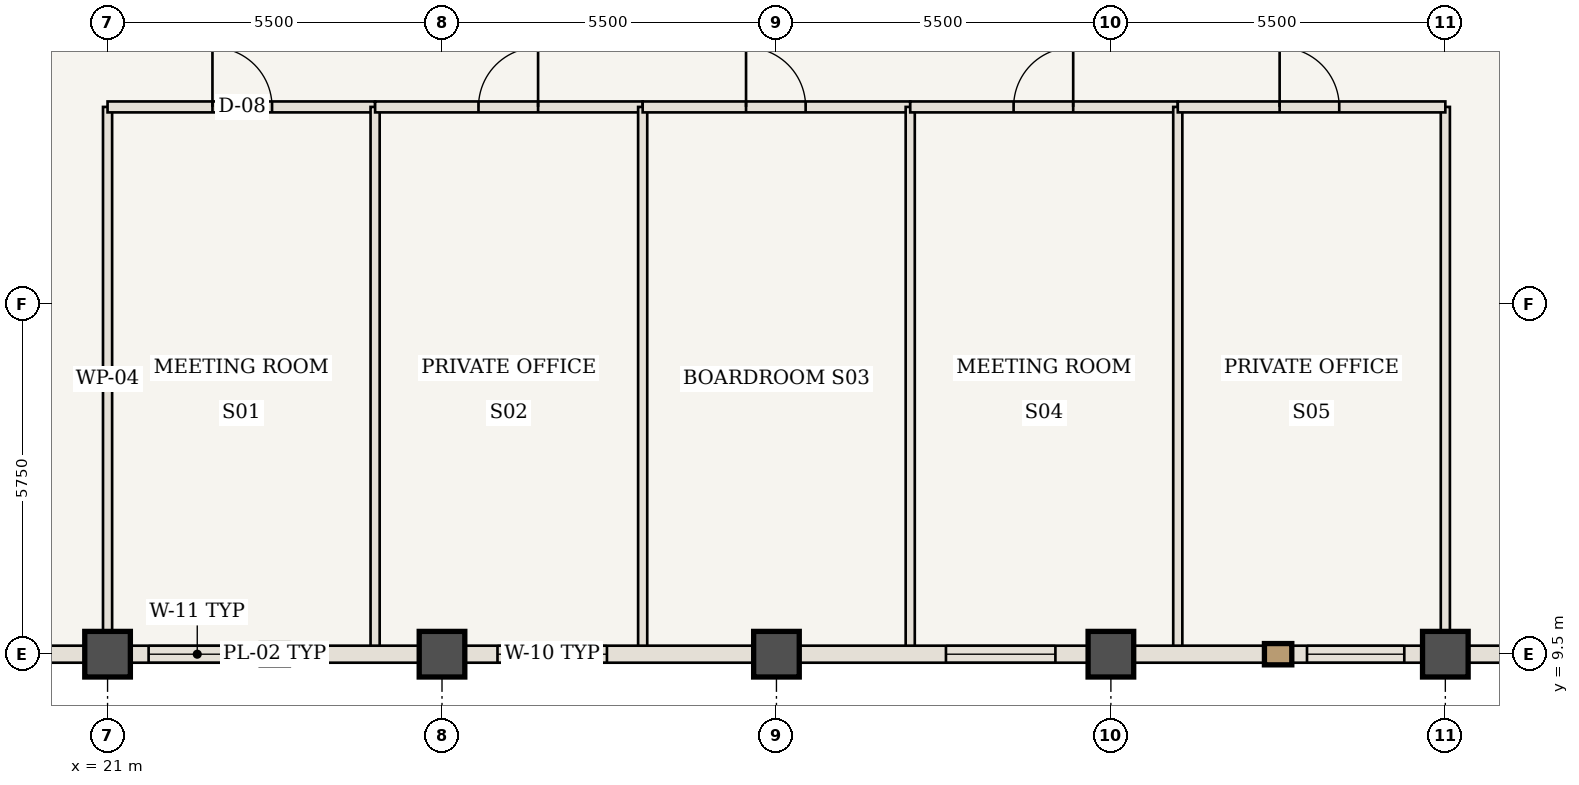
"""IFC4 building model, lengths in metres.
Left out: names, types, materials, properties, quantities, classifications, styles, units other than length and angle.
Written with IfcOpenShell. Run it as: python <this file> out.ifc"""

import sys

from ifc_helpers import new_model, si_unit, direction, frame, frame_2d, origin, origin_2d, place, context, subcontext, project, spatial, rectangle, extrude, element, fill, save


model = new_model("IFC4")
c1 = context("Model", 3, precision=1e-05, world=origin(), true_north=direction((0.0, 1.0)))
c2 = subcontext(c1, "Body", "Model", "MODEL_VIEW")
j1 = project(units=[si_unit("LENGTHUNIT", "METRE"), si_unit("PLANEANGLEUNIT", "RADIAN")], contexts=[c1])
p1 = place(None, origin())
s1 = spatial("IfcSite", under=j1, at=p1, CompositionType="ELEMENT")
p2 = place(p1, origin())
s2 = spatial("IfcBuilding", under=s1, at=p2, CompositionType="ELEMENT")
p3 = place(p2, frame((0.0, 0.0, 285.25)))
s3 = spatial("IfcBuildingStorey", under=s2, at=p3, CompositionType="ELEMENT", Elevation=285.25)
for number, where, z_axis, x_axis in (
    (1, (21.0, 9.5, 0.0), (0.0, 0.0, 1.0), (1.0, 0.0, 0.0)),
    (2, (26.5, 9.5, 0.0), (0.0, 0.0, 1.0), (1.0, 0.0, 0.0)),
    (3, (32.0, 9.5, 0.0), (0.0, 0.0, 1.0), (1.0, 0.0, 0.0)),
    (4, (37.5, 9.5, 0.0), (0.0, 0.0, 1.0), (1.0, 0.0, 0.0)),
    (5, (43.0, 9.5, 0.0), (0.0, 0.0, 1.0), (1.0, 0.0, 0.0)),
):
    element("IfcColumn", number, at=place(p3, frame(where, z_axis=z_axis, x_axis=x_axis)), inside=s3, PredefinedType="COLUMN", context=c2, shape_type="SweptSolid", body=[
        extrude(rectangle(XDim=0.75, YDim=0.75, at=origin_2d()), origin(), (0.0, 0.0, 1.0), 3.85),
    ])
for number, where, z_axis, x_axis in (
    (6, (21.0, 9.56, 0.0), (0.0, 0.0, 1.0), (0.0, 1.0, 0.0)),
    (7, (43.0, 9.56, 0.0), (0.0, 0.0, 1.0), (0.0, 1.0, 0.0)),
):
    element("IfcWall", number, at=place(p3, frame(where, z_axis=z_axis, x_axis=x_axis)), inside=s3, PredefinedType="STANDARD", context=c2, shape_type="SweptSolid", body=[
        extrude(rectangle(XDim=8.94, YDim=0.15, at=frame_2d((4.47, 0.0))), origin(), (0.0, 0.0, 1.0), 3.685),
    ])
p4 = place(p3, frame((21.0, 18.5, 0.0), z_axis=(0.0, 0.0, 1.0), x_axis=(1.0, 0.0, 0.0)))
e8 = element("IfcWall", 8, at=p4, inside=s3, PredefinedType="STANDARD", context=c2, shape_type="SweptSolid", body=[
    extrude(rectangle(XDim=4.4, YDim=0.18, at=frame_2d((2.2, 0.0))), origin(), (0.0, 0.0, 1.0), 3.685),
])
p5 = place(p4, frame((1.725, 0.0, 0.0)))
e9 = element("IfcOpeningElement", 9, at=p5, cuts=e8, PredefinedType="OPENING", context=c2, shape_type="SweptSolid", body=[
    extrude(rectangle(XDim=0.98, YDim=2.2, at=frame_2d((0.49, 1.1))), frame((0.0, 0.1, 0.0), z_axis=(0.0, -1.0, 0.0), x_axis=(1.0, 0.0, 0.0)), (0.0, 0.0, 1.0), 0.2),
])
p6 = place(p3, frame((25.4, 9.56, 0.0), z_axis=(0.0, 0.0, 1.0), x_axis=(0.0, 1.0, 0.0)))
e10 = element("IfcWall", 10, at=p6, inside=s3, PredefinedType="STANDARD", context=c2, shape_type="SweptSolid", body=[
    extrude(rectangle(XDim=8.94, YDim=0.15, at=frame_2d((4.47, 0.0))), origin(), (0.0, 0.0, 1.0), 3.685),
])
p7 = place(p3, frame((25.4, 18.5, 0.0), z_axis=(0.0, 0.0, 1.0), x_axis=(1.0, 0.0, 0.0)))
e11 = element("IfcWall", 11, at=p7, inside=s3, PredefinedType="STANDARD", context=c2, shape_type="SweptSolid", body=[
    extrude(rectangle(XDim=4.4, YDim=0.18, at=frame_2d((2.2, 0.0))), origin(), (0.0, 0.0, 1.0), 3.685),
])
p8 = place(p7, frame((1.7, 0.0, 0.0)))
e12 = element("IfcOpeningElement", 12, at=p8, cuts=e11, PredefinedType="OPENING", context=c2, shape_type="SweptSolid", body=[
    extrude(rectangle(XDim=0.98, YDim=2.2, at=frame_2d((0.49, 1.1))), frame((0.0, 0.1, 0.0), z_axis=(0.0, -1.0, 0.0), x_axis=(1.0, 0.0, 0.0)), (0.0, 0.0, 1.0), 0.2),
])
p9 = place(p3, frame((29.8, 9.56, 0.0), z_axis=(0.0, 0.0, 1.0), x_axis=(0.0, 1.0, 0.0)))
e13 = element("IfcWall", 13, at=p9, inside=s3, PredefinedType="STANDARD", context=c2, shape_type="SweptSolid", body=[
    extrude(rectangle(XDim=8.94, YDim=0.15, at=frame_2d((4.47, 0.0))), origin(), (0.0, 0.0, 1.0), 3.685),
])
p10 = place(p3, frame((29.8, 18.5, 0.0), z_axis=(0.0, 0.0, 1.0), x_axis=(1.0, 0.0, 0.0)))
e14 = element("IfcWall", 14, at=p10, inside=s3, PredefinedType="STANDARD", context=c2, shape_type="SweptSolid", body=[
    extrude(rectangle(XDim=4.4, YDim=0.18, at=frame_2d((2.2, 0.0))), origin(), (0.0, 0.0, 1.0), 3.685),
])
p11 = place(p10, frame((1.7, 0.0, 0.0)))
e15 = element("IfcOpeningElement", 15, at=p11, cuts=e14, PredefinedType="OPENING", context=c2, shape_type="SweptSolid", body=[
    extrude(rectangle(XDim=0.98, YDim=2.2, at=frame_2d((0.49, 1.1))), frame((0.0, 0.1, 0.0), z_axis=(0.0, -1.0, 0.0), x_axis=(1.0, 0.0, 0.0)), (0.0, 0.0, 1.0), 0.2),
])
p12 = place(p3, frame((34.2, 9.56, 0.0), z_axis=(0.0, 0.0, 1.0), x_axis=(0.0, 1.0, 0.0)))
e16 = element("IfcWall", 16, at=p12, inside=s3, PredefinedType="STANDARD", context=c2, shape_type="SweptSolid", body=[
    extrude(rectangle(XDim=8.94, YDim=0.15, at=frame_2d((4.47, 0.0))), origin(), (0.0, 0.0, 1.0), 3.685),
])
p13 = place(p3, frame((34.2, 18.5, 0.0), z_axis=(0.0, 0.0, 1.0), x_axis=(1.0, 0.0, 0.0)))
e17 = element("IfcWall", 17, at=p13, inside=s3, PredefinedType="STANDARD", context=c2, shape_type="SweptSolid", body=[
    extrude(rectangle(XDim=4.4, YDim=0.18, at=frame_2d((2.2, 0.0))), origin(), (0.0, 0.0, 1.0), 3.685),
])
p14 = place(p13, frame((1.7, 0.0, 0.0)))
e18 = element("IfcOpeningElement", 18, at=p14, cuts=e17, PredefinedType="OPENING", context=c2, shape_type="SweptSolid", body=[
    extrude(rectangle(XDim=0.98, YDim=2.2, at=frame_2d((0.49, 1.1))), frame((0.0, 0.1, 0.0), z_axis=(0.0, -1.0, 0.0), x_axis=(1.0, 0.0, 0.0)), (0.0, 0.0, 1.0), 0.2),
])
p15 = place(p3, frame((38.6, 9.56, 0.0), z_axis=(0.0, 0.0, 1.0), x_axis=(0.0, 1.0, 0.0)))
e19 = element("IfcWall", 19, at=p15, inside=s3, PredefinedType="STANDARD", context=c2, shape_type="SweptSolid", body=[
    extrude(rectangle(XDim=8.94, YDim=0.15, at=frame_2d((4.47, 0.0))), origin(), (0.0, 0.0, 1.0), 3.685),
])
p16 = place(p3, frame((38.6, 18.5, 0.0), z_axis=(0.0, 0.0, 1.0), x_axis=(1.0, 0.0, 0.0)))
e20 = element("IfcWall", 20, at=p16, inside=s3, PredefinedType="STANDARD", context=c2, shape_type="SweptSolid", body=[
    extrude(rectangle(XDim=4.4, YDim=0.18, at=frame_2d((2.2, 0.0))), origin(), (0.0, 0.0, 1.0), 3.685),
])
p17 = place(p16, frame((1.675, 0.0, 0.0)))
e21 = element("IfcOpeningElement", 21, at=p17, cuts=e20, PredefinedType="OPENING", context=c2, shape_type="SweptSolid", body=[
    extrude(rectangle(XDim=0.98, YDim=2.2, at=frame_2d((0.49, 1.1))), frame((0.0, 0.1, 0.0), z_axis=(0.0, -1.0, 0.0), x_axis=(1.0, 0.0, 0.0)), (0.0, 0.0, 1.0), 0.2),
])
p18 = place(p3, frame((21.0, 9.5, 0.0), z_axis=(0.0, 0.0, 1.0), x_axis=(-1.0, 0.0, 0.0)))
e22 = element("IfcWall", 22, at=p18, inside=s3, PredefinedType="USERDEFINED", context=c2, shape_type="SweptSolid", body=[
    extrude(rectangle(XDim=5.5, YDim=0.28, at=frame_2d((2.75, 0.0))), origin(), (0.0, 0.0, 1.0), 2.985),
])
p19 = place(p3, frame((26.5, 9.5, 0.0), z_axis=(0.0, 0.0, 1.0), x_axis=(-1.0, 0.0, 0.0)))
e23 = element("IfcWall", 23, at=p19, inside=s3, PredefinedType="USERDEFINED", context=c2, shape_type="SweptSolid", body=[
    extrude(rectangle(XDim=5.5, YDim=0.28, at=frame_2d((2.75, 0.0))), origin(), (0.0, 0.0, 1.0), 2.985),
])
p20 = place(p19, frame((3.225, 0.0, 0.85)))
e24 = element("IfcOpeningElement", 24, at=p20, cuts=e23, PredefinedType="OPENING", context=c2, shape_type="SweptSolid", body=[
    extrude(rectangle(XDim=1.6, YDim=1.935, at=frame_2d((0.8, 0.968))), frame((0.0, 0.15, 0.0), z_axis=(0.0, -1.0, 0.0), x_axis=(1.0, 0.0, 0.0)), (0.0, 0.0, 1.0), 0.3),
])
p21 = place(p3, frame((32.0, 9.5, 0.0), z_axis=(0.0, 0.0, 1.0), x_axis=(-1.0, 0.0, 0.0)))
e25 = element("IfcWall", 25, at=p21, inside=s3, PredefinedType="USERDEFINED", context=c2, shape_type="SweptSolid", body=[
    extrude(rectangle(XDim=5.5, YDim=0.28, at=frame_2d((2.75, 0.0))), origin(), (0.0, 0.0, 1.0), 2.985),
])
p22 = place(p21, frame((2.788, 0.0, 0.85)))
e26 = element("IfcOpeningElement", 26, at=p22, cuts=e25, PredefinedType="OPENING", context=c2, shape_type="SweptSolid", body=[
    extrude(rectangle(XDim=1.8, YDim=1.935, at=frame_2d((0.9, 0.968))), frame((0.0, 0.15, 0.0), z_axis=(0.0, -1.0, 0.0), x_axis=(1.0, 0.0, 0.0)), (0.0, 0.0, 1.0), 0.3),
])
p23 = place(p3, frame((37.5, 9.5, 0.0), z_axis=(0.0, 0.0, 1.0), x_axis=(-1.0, 0.0, 0.0)))
e27 = element("IfcWall", 27, at=p23, inside=s3, PredefinedType="USERDEFINED", context=c2, shape_type="SweptSolid", body=[
    extrude(rectangle(XDim=5.5, YDim=0.28, at=frame_2d((2.75, 0.0))), origin(), (0.0, 0.0, 1.0), 2.985),
])
p24 = place(p23, frame((0.913, 0.0, 0.85)))
e28 = element("IfcOpeningElement", 28, at=p24, cuts=e27, PredefinedType="OPENING", context=c2, shape_type="SweptSolid", body=[
    extrude(rectangle(XDim=1.8, YDim=1.935, at=frame_2d((0.9, 0.968))), frame((0.0, 0.15, 0.0), z_axis=(0.0, -1.0, 0.0), x_axis=(1.0, 0.0, 0.0)), (0.0, 0.0, 1.0), 0.3),
])
p25 = place(p3, frame((43.0, 9.5, 0.0), z_axis=(0.0, 0.0, 1.0), x_axis=(-1.0, 0.0, 0.0)))
e29 = element("IfcWall", 29, at=p25, inside=s3, PredefinedType="USERDEFINED", context=c2, shape_type="SweptSolid", body=[
    extrude(rectangle(XDim=5.5, YDim=0.28, at=frame_2d((2.75, 0.0))), origin(), (0.0, 0.0, 1.0), 2.985),
])
p26 = place(p25, frame((0.675, 0.0, 0.85)))
e30 = element("IfcOpeningElement", 30, at=p26, cuts=e29, PredefinedType="OPENING", context=c2, shape_type="SweptSolid", body=[
    extrude(rectangle(XDim=1.6, YDim=1.935, at=frame_2d((0.8, 0.968))), frame((0.0, 0.15, 0.0), z_axis=(0.0, -1.0, 0.0), x_axis=(1.0, 0.0, 0.0)), (0.0, 0.0, 1.0), 0.3),
])
p27 = place(p3, frame((48.5, 9.5, 0.0), z_axis=(0.0, 0.0, 1.0), x_axis=(-1.0, 0.0, 0.0)))
e31 = element("IfcWall", 31, at=p27, inside=s3, PredefinedType="USERDEFINED", context=c2, shape_type="SweptSolid", body=[
    extrude(rectangle(XDim=5.5, YDim=0.28, at=frame_2d((2.75, 0.0))), origin(), (0.0, 0.0, 1.0), 2.985),
])
p28 = place(p5, origin())
e32 = element("IfcDoor", 32, at=p28, inside=s3, OperationType="SINGLE_SWING_LEFT", PredefinedType="DOOR", context=c2, shape_type="SweptSolid", body=[
    extrude(rectangle(XDim=0.98, YDim=2.2, at=frame_2d((0.49, 1.1))), frame((0.0, 0.025, 0.0), z_axis=(0.0, -1.0, 0.0), x_axis=(1.0, 0.0, 0.0)), (0.0, 0.0, 1.0), 0.05),
])
fill(e9, e32)
p29 = place(p8, origin())
e33 = element("IfcDoor", 33, at=p29, inside=s3, OperationType="SINGLE_SWING_RIGHT", PredefinedType="DOOR", context=c2, shape_type="SweptSolid", body=[
    extrude(rectangle(XDim=0.98, YDim=2.2, at=frame_2d((0.49, 1.1))), frame((0.0, 0.025, 0.0), z_axis=(0.0, -1.0, 0.0), x_axis=(1.0, 0.0, 0.0)), (0.0, 0.0, 1.0), 0.05),
])
fill(e12, e33)
p30 = place(p11, origin())
e34 = element("IfcDoor", 34, at=p30, inside=s3, OperationType="SINGLE_SWING_LEFT", PredefinedType="DOOR", context=c2, shape_type="SweptSolid", body=[
    extrude(rectangle(XDim=0.98, YDim=2.2, at=frame_2d((0.49, 1.1))), frame((0.0, 0.025, 0.0), z_axis=(0.0, -1.0, 0.0), x_axis=(1.0, 0.0, 0.0)), (0.0, 0.0, 1.0), 0.05),
])
fill(e15, e34)
p31 = place(p14, origin())
e35 = element("IfcDoor", 35, at=p31, inside=s3, OperationType="SINGLE_SWING_RIGHT", PredefinedType="DOOR", context=c2, shape_type="SweptSolid", body=[
    extrude(rectangle(XDim=0.98, YDim=2.2, at=frame_2d((0.49, 1.1))), frame((0.0, 0.025, 0.0), z_axis=(0.0, -1.0, 0.0), x_axis=(1.0, 0.0, 0.0)), (0.0, 0.0, 1.0), 0.05),
])
fill(e18, e35)
p32 = place(p17, origin())
e36 = element("IfcDoor", 36, at=p32, inside=s3, OperationType="SINGLE_SWING_LEFT", PredefinedType="DOOR", context=c2, shape_type="SweptSolid", body=[
    extrude(rectangle(XDim=0.98, YDim=2.2, at=frame_2d((0.49, 1.1))), frame((0.0, 0.025, 0.0), z_axis=(0.0, -1.0, 0.0), x_axis=(1.0, 0.0, 0.0)), (0.0, 0.0, 1.0), 0.05),
])
fill(e21, e36)
p33 = place(p20, origin())
e37 = element("IfcWindow", 37, at=p33, inside=s3, PartitioningType="SINGLE_PANEL", PredefinedType="WINDOW", context=c2, shape_type="SweptSolid", body=[
    extrude(rectangle(XDim=1.6, YDim=1.935, at=frame_2d((0.8, 0.968))), frame((0.0, 0.03, 0.0), z_axis=(0.0, -1.0, 0.0), x_axis=(1.0, 0.0, 0.0)), (0.0, 0.0, 1.0), 0.06),
])
fill(e24, e37)
p34 = place(p22, origin())
e38 = element("IfcWindow", 38, at=p34, inside=s3, PartitioningType="SINGLE_PANEL", PredefinedType="WINDOW", context=c2, shape_type="SweptSolid", body=[
    extrude(rectangle(XDim=1.8, YDim=1.935, at=frame_2d((0.9, 0.968))), frame((0.0, 0.03, 0.0), z_axis=(0.0, -1.0, 0.0), x_axis=(1.0, 0.0, 0.0)), (0.0, 0.0, 1.0), 0.06),
])
fill(e26, e38)
p35 = place(p24, origin())
e39 = element("IfcWindow", 39, at=p35, inside=s3, PartitioningType="SINGLE_PANEL", PredefinedType="WINDOW", context=c2, shape_type="SweptSolid", body=[
    extrude(rectangle(XDim=1.8, YDim=1.935, at=frame_2d((0.9, 0.968))), frame((0.0, 0.03, 0.0), z_axis=(0.0, -1.0, 0.0), x_axis=(1.0, 0.0, 0.0)), (0.0, 0.0, 1.0), 0.06),
])
fill(e28, e39)
p36 = place(p26, origin())
e40 = element("IfcWindow", 40, at=p36, inside=s3, PartitioningType="SINGLE_PANEL", PredefinedType="WINDOW", context=c2, shape_type="SweptSolid", body=[
    extrude(rectangle(XDim=1.6, YDim=1.935, at=frame_2d((0.8, 0.968))), frame((0.0, 0.03, 0.0), z_axis=(0.0, -1.0, 0.0), x_axis=(1.0, 0.0, 0.0)), (0.0, 0.0, 1.0), 0.06),
])
fill(e30, e40)
save(model, sys.argv[1])
